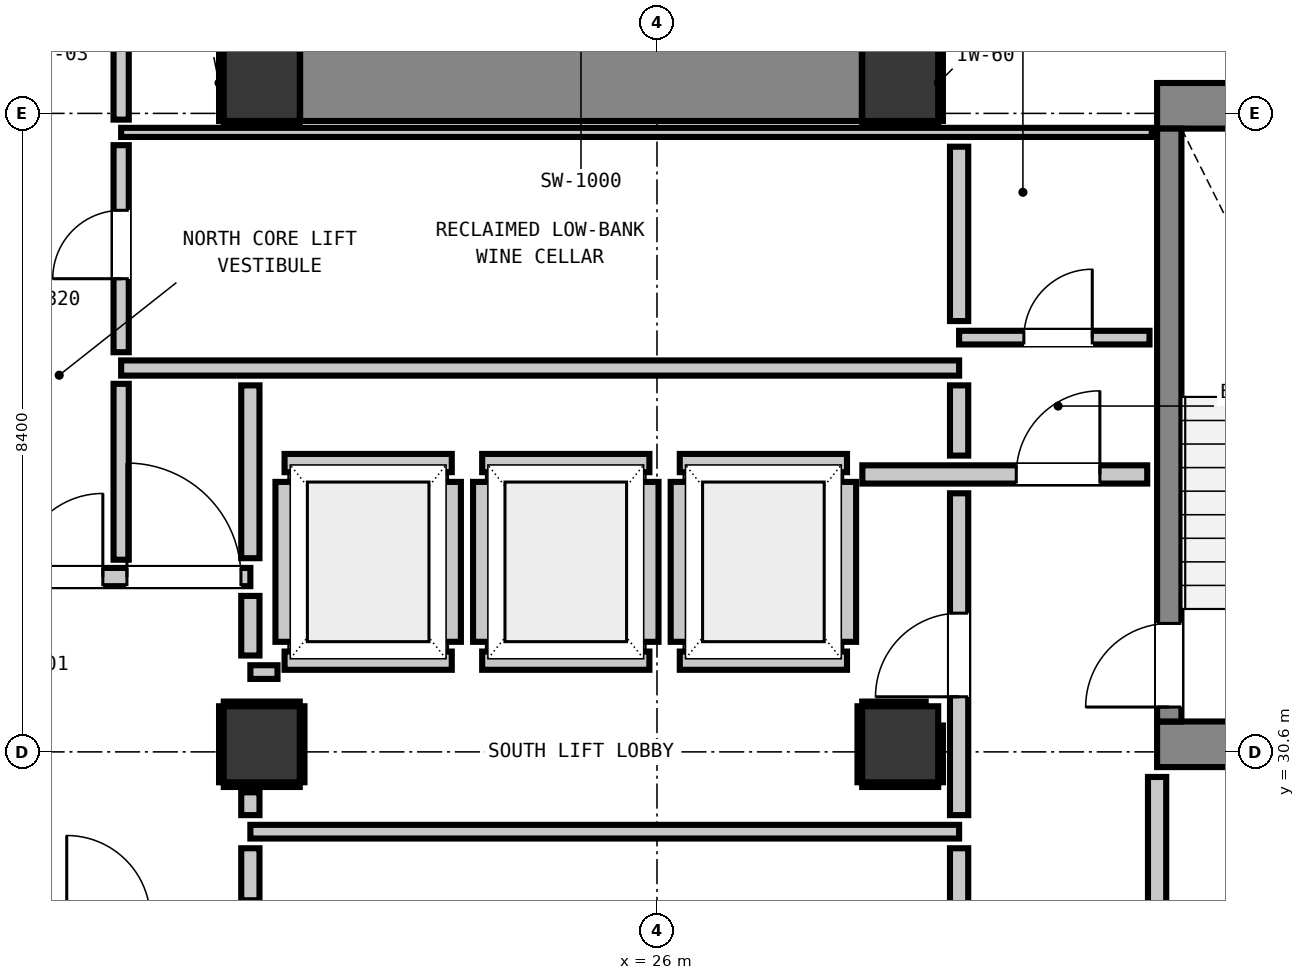
"""IFC4 building model, lengths in metres.
Left out: names, types, materials, properties, quantities, classifications, styles, units other than length and angle.
Written with IfcOpenShell. Run it as: python <this file> out.ifc"""

import sys

from ifc_helpers import new_model, si_unit, direction, frame, frame_2d, origin, origin_2d, place, context, subcontext, project, spatial, rectangle, extrude, element, fill, save


model = new_model("IFC4")
c1 = context("Model", 3, precision=1e-05, world=origin(), true_north=direction((0.0, 1.0)))
c2 = subcontext(c1, "Body", "Model", "MODEL_VIEW")
j1 = project(units=[si_unit("LENGTHUNIT", "METRE"), si_unit("PLANEANGLEUNIT", "RADIAN")], contexts=[c1])
p1 = place(None, origin())
s1 = spatial("IfcSite", under=j1, at=p1, CompositionType="ELEMENT")
p2 = place(p1, origin())
s2 = spatial("IfcBuilding", under=s1, at=p2, CompositionType="ELEMENT")
p3 = place(p2, frame((0.0, 0.0, 159.2)))
s3 = spatial("IfcBuildingStorey", under=s2, at=p3, CompositionType="ELEMENT", Elevation=159.2)
for number, where, z_axis, x_axis in (
    (1, (20.8, 39.4, 0.0), (0.0, 0.0, 1.0), (1.0, 0.0, 0.0)),
    (2, (29.2, 39.4, 0.0), (0.0, 0.0, 1.0), (1.0, 0.0, 0.0)),
):
    element("IfcColumn", number, at=place(p3, frame(where, z_axis=z_axis, x_axis=x_axis)), inside=s3, PredefinedType="COLUMN", context=c2, shape_type="SweptSolid", body=[
        extrude(rectangle(XDim=1.0, YDim=1.0, at=origin_2d()), origin(), (0.0, 0.0, 1.0), 3.32),
    ])
p4 = place(p3, frame((32.58, 39.1, 0.0), z_axis=(0.0, 0.0, 1.0), x_axis=(1.0, 0.0, 0.0)))
e3 = element("IfcWall", 3, at=p4, inside=s3, PredefinedType="SHEAR", context=c2, shape_type="SweptSolid", body=[
    extrude(rectangle(XDim=4.08, YDim=0.6, at=frame_2d((2.04, 0.0))), origin(), (0.0, 0.0, 1.0), 3.32),
])
p5 = place(p3, frame((32.58, 30.7, 0.0), z_axis=(0.0, 0.0, 1.0), x_axis=(1.0, 0.0, 0.0)))
e4 = element("IfcWall", 4, at=p5, inside=s3, PredefinedType="SHEAR", context=c2, shape_type="SweptSolid", body=[
    extrude(rectangle(XDim=3.415, YDim=0.6, at=frame_2d((1.708, 0.0))), origin(), (0.0, 0.0, 1.0), 3.32),
])
p6 = place(p3, frame((21.305, 39.4, 0.0), z_axis=(0.0, 0.0, 1.0), x_axis=(1.0, 0.0, 0.0)))
e5 = element("IfcWall", 5, at=p6, inside=s3, PredefinedType="SHEAR", context=c2, shape_type="SweptSolid", body=[
    extrude(rectangle(XDim=7.39, YDim=1.0, at=frame_2d((3.695, 0.0))), origin(), (0.0, 0.0, 1.0), 3.32),
])
p7 = place(p3, frame((32.74, 31.0, 0.0), z_axis=(0.0, 0.0, 1.0), x_axis=(0.0, 1.0, 0.0)))
e6 = element("IfcWall", 6, at=p7, inside=s3, PredefinedType="SHEAR", context=c2, shape_type="SweptSolid", body=[
    extrude(rectangle(XDim=7.8, YDim=0.32, at=frame_2d((3.9, 0.0))), origin(), (0.0, 0.0, 1.0), 3.32),
])
p8 = place(p7, frame((0.19, 0.0, 0.0)))
e7 = element("IfcOpeningElement", 7, at=p8, cuts=e6, PredefinedType="OPENING", context=c2, shape_type="SweptSolid", body=[
    extrude(rectangle(XDim=1.1, YDim=2.15, at=frame_2d((0.55, 1.075))), frame((0.0, 0.17, 0.0), z_axis=(0.0, -1.0, 0.0), x_axis=(1.0, 0.0, 0.0)), (0.0, 0.0, 1.0), 0.34),
])
for number, where, z_axis, x_axis in (
    (8, (20.8, 30.7, 0.0), (0.0, 0.0, 1.0), (1.0, 0.0, 0.0)),
    (9, (29.2, 30.7, 0.0), (0.0, 0.0, 1.0), (1.0, 0.0, 0.0)),
):
    element("IfcColumn", number, at=place(p3, frame(where, z_axis=z_axis, x_axis=x_axis)), inside=s3, PredefinedType="COLUMN", context=c2, shape_type="SweptSolid", body=[
        extrude(rectangle(XDim=1.0, YDim=1.0, at=origin_2d()), origin(), (0.0, 0.0, 1.0), 3.32),
    ])
for number, where, z_axis, x_axis in (
    (10, (21.1, 31.8, 0.0), (0.0, 0.0, 1.0), (1.0, 0.0, 0.0)),
    (11, (21.1, 34.4, 0.0), (0.0, 0.0, 1.0), (1.0, 0.0, 0.0)),
):
    element("IfcWall", number, at=place(p3, frame(where, z_axis=z_axis, x_axis=x_axis)), inside=s3, PredefinedType="PARTITIONING", context=c2, shape_type="SweptSolid", body=[
        extrude(rectangle(XDim=2.2, YDim=0.24, at=frame_2d((1.1, 0.0))), origin(), (0.0, 0.0, 1.0), 3.08),
    ])
p9 = place(p3, frame((21.1, 32.048, 0.0), z_axis=(0.0, 0.0, 1.0), x_axis=(0.0, 1.0, 0.0)))
e12 = element("IfcWall", 12, at=p9, inside=s3, PredefinedType="PARTITIONING", context=c2, shape_type="SweptSolid", body=[
    extrude(rectangle(XDim=2.104, YDim=0.24, at=frame_2d((1.052, 0.0))), origin(), (0.0, 0.0, 1.0), 2.315),
])
p10 = place(p3, frame((23.3, 32.048, 0.0), z_axis=(0.0, 0.0, 1.0), x_axis=(0.0, 1.0, 0.0)))
e13 = element("IfcWall", 13, at=p10, inside=s3, PredefinedType="PARTITIONING", context=c2, shape_type="SweptSolid", body=[
    extrude(rectangle(XDim=2.104, YDim=0.24, at=frame_2d((1.052, 0.0))), origin(), (0.0, 0.0, 1.0), 3.08),
])
for number, where, z_axis, x_axis in (
    (14, (23.7, 31.8, 0.0), (0.0, 0.0, 1.0), (1.0, 0.0, 0.0)),
    (15, (23.7, 34.4, 0.0), (0.0, 0.0, 1.0), (1.0, 0.0, 0.0)),
):
    element("IfcWall", number, at=place(p3, frame(where, z_axis=z_axis, x_axis=x_axis)), inside=s3, PredefinedType="PARTITIONING", context=c2, shape_type="SweptSolid", body=[
        extrude(rectangle(XDim=2.2, YDim=0.24, at=frame_2d((1.1, 0.0))), origin(), (0.0, 0.0, 1.0), 3.08),
    ])
for number, where, z_axis, x_axis in (
    (16, (23.7, 32.048, 0.0), (0.0, 0.0, 1.0), (0.0, 1.0, 0.0)),
    (17, (25.9, 32.048, 0.0), (0.0, 0.0, 1.0), (0.0, 1.0, 0.0)),
):
    element("IfcWall", number, at=place(p3, frame(where, z_axis=z_axis, x_axis=x_axis)), inside=s3, PredefinedType="PARTITIONING", context=c2, shape_type="SweptSolid", body=[
        extrude(rectangle(XDim=2.104, YDim=0.24, at=frame_2d((1.052, 0.0))), origin(), (0.0, 0.0, 1.0), 3.08),
    ])
for number, where, z_axis, x_axis in (
    (18, (26.3, 31.8, 0.0), (0.0, 0.0, 1.0), (1.0, 0.0, 0.0)),
    (19, (26.3, 34.4, 0.0), (0.0, 0.0, 1.0), (1.0, 0.0, 0.0)),
):
    element("IfcWall", number, at=place(p3, frame(where, z_axis=z_axis, x_axis=x_axis)), inside=s3, PredefinedType="PARTITIONING", context=c2, shape_type="SweptSolid", body=[
        extrude(rectangle(XDim=2.2, YDim=0.24, at=frame_2d((1.1, 0.0))), origin(), (0.0, 0.0, 1.0), 3.08),
    ])
for number, where, z_axis, x_axis in (
    (20, (26.3, 32.048, 0.0), (0.0, 0.0, 1.0), (0.0, 1.0, 0.0)),
    (21, (28.5, 32.048, 0.0), (0.0, 0.0, 1.0), (0.0, 1.0, 0.0)),
):
    element("IfcWall", number, at=place(p3, frame(where, z_axis=z_axis, x_axis=x_axis)), inside=s3, PredefinedType="PARTITIONING", context=c2, shape_type="SweptSolid", body=[
        extrude(rectangle(XDim=2.104, YDim=0.24, at=frame_2d((1.052, 0.0))), origin(), (0.0, 0.0, 1.0), 3.08),
    ])
p11 = place(p3, frame((17.45, 32.9, 0.0), z_axis=(0.0, 0.0, 1.0), x_axis=(1.0, 0.0, 0.0)))
e22 = element("IfcWall", 22, at=p11, inside=s3, PredefinedType="PARTITIONING", context=c2, shape_type="SweptSolid", body=[
    extrude(rectangle(XDim=3.2, YDim=0.24, at=frame_2d((1.6, 0.0))), origin(), (0.0, 0.0, 1.0), 3.08),
])
p12 = place(p11, frame((0.159, 0.0, 0.0)))
e23 = element("IfcOpeningElement", 23, at=p12, cuts=e22, PredefinedType="OPENING", context=c2, shape_type="SweptSolid", body=[
    extrude(rectangle(XDim=1.1, YDim=2.15, at=frame_2d((0.55, 1.075))), frame((0.0, 0.13, 0.0), z_axis=(0.0, -1.0, 0.0), x_axis=(1.0, 0.0, 0.0)), (0.0, 0.0, 1.0), 0.26),
])
p13 = place(p11, frame((1.576, 0.0, 0.0)))
e24 = element("IfcOpeningElement", 24, at=p13, cuts=e22, PredefinedType="OPENING", context=c2, shape_type="SweptSolid", body=[
    extrude(rectangle(XDim=1.5, YDim=2.15, at=frame_2d((0.75, 1.075))), frame((0.0, 0.13, 0.0), z_axis=(0.0, -1.0, 0.0), x_axis=(1.0, 0.0, 0.0)), (0.0, 0.0, 1.0), 0.26),
])
p14 = place(p3, frame((28.702, 34.25, 0.0), z_axis=(0.0, 0.0, 1.0), x_axis=(1.0, 0.0, 0.0)))
e25 = element("IfcWall", 25, at=p14, inside=s3, PredefinedType="PARTITIONING", context=c2, shape_type="SweptSolid", body=[
    extrude(rectangle(XDim=3.748, YDim=0.24, at=frame_2d((1.874, 0.0))), origin(), (0.0, 0.0, 1.0), 3.08),
])
p15 = place(p14, frame((2.025, 0.0, 0.0)))
e26 = element("IfcOpeningElement", 26, at=p15, cuts=e25, PredefinedType="OPENING", context=c2, shape_type="SweptSolid", body=[
    extrude(rectangle(XDim=1.1, YDim=2.15, at=frame_2d((0.55, 1.075))), frame((0.0, 0.13, 0.0), z_axis=(0.0, -1.0, 0.0), x_axis=(1.0, 0.0, 0.0)), (0.0, 0.0, 1.0), 0.26),
])
p16 = place(p3, frame((18.95, 35.65, 0.0), z_axis=(0.0, 0.0, 1.0), x_axis=(1.0, 0.0, 0.0)))
e27 = element("IfcWall", 27, at=p16, inside=s3, PredefinedType="PARTITIONING", context=c2, shape_type="SweptSolid", body=[
    extrude(rectangle(XDim=11.025, YDim=0.2, at=frame_2d((5.513, 0.0))), origin(), (0.0, 0.0, 1.0), 3.08),
])
p17 = place(p3, frame((20.65, 29.55, 0.0), z_axis=(0.0, 0.0, 1.0), x_axis=(1.0, 0.0, 0.0)))
e28 = element("IfcWall", 28, at=p17, inside=s3, PredefinedType="PARTITIONING", context=c2, shape_type="SweptSolid", body=[
    extrude(rectangle(XDim=9.325, YDim=0.18, at=frame_2d((4.663, 0.0))), origin(), (0.0, 0.0, 1.0), 3.08),
])
p18 = place(p3, frame((20.65, 31.65, 0.0), z_axis=(0.0, 0.0, 1.0), x_axis=(1.0, 0.0, 0.0)))
e29 = element("IfcWall", 29, at=p18, inside=s3, PredefinedType="PARTITIONING", context=c2, shape_type="SweptSolid", body=[
    extrude(rectangle(XDim=0.357, YDim=0.18, at=frame_2d((0.179, 0.0))), origin(), (0.0, 0.0, 1.0), 3.08),
])
p19 = place(p3, frame((29.975, 36.05, 0.0), z_axis=(0.0, 0.0, 1.0), x_axis=(1.0, 0.0, 0.0)))
e30 = element("IfcWall", 30, at=p19, inside=s3, PredefinedType="PARTITIONING", context=c2, shape_type="SweptSolid", body=[
    extrude(rectangle(XDim=2.505, YDim=0.18, at=frame_2d((1.252, 0.0))), origin(), (0.0, 0.0, 1.0), 3.08),
])
p20 = place(p19, frame((0.852, 0.0, 0.0)))
e31 = element("IfcOpeningElement", 31, at=p20, cuts=e30, PredefinedType="OPENING", context=c2, shape_type="SweptSolid", body=[
    extrude(rectangle(XDim=0.9, YDim=2.1, at=frame_2d((0.45, 1.05))), frame((0.0, 0.1, 0.0), z_axis=(0.0, -1.0, 0.0), x_axis=(1.0, 0.0, 0.0)), (0.0, 0.0, 1.0), 0.2),
])
p21 = place(p3, frame((18.95, 38.75, 0.0), z_axis=(0.0, 0.0, 1.0), x_axis=(1.0, 0.0, 0.0)))
e32 = element("IfcWall", 32, at=p21, inside=s3, PredefinedType="PARTITIONING", context=c2, shape_type="SweptSolid", body=[
    extrude(rectangle(XDim=13.56, YDim=0.12, at=frame_2d((6.78, 0.0))), origin(), (0.0, 0.0, 1.0), 3.08),
])
p22 = place(p3, frame((20.65, 28.648, 0.0), z_axis=(0.0, 0.0, 1.0), x_axis=(0.0, 1.0, 0.0)))
e33 = element("IfcWall", 33, at=p22, inside=s3, PredefinedType="PARTITIONING", context=c2, shape_type="SweptSolid", body=[
    extrude(rectangle(XDim=0.684, YDim=0.24, at=frame_2d((0.342, 0.0))), origin(), (0.0, 0.0, 1.0), 2.315),
])
p23 = place(p3, frame((20.65, 29.768, 0.0), z_axis=(0.0, 0.0, 1.0), x_axis=(0.0, 1.0, 0.0)))
e34 = element("IfcWall", 34, at=p23, inside=s3, PredefinedType="PARTITIONING", context=c2, shape_type="SweptSolid", body=[
    extrude(rectangle(XDim=0.3, YDim=0.24, at=frame_2d((0.15, 0.0))), origin(), (0.0, 0.0, 1.0), 2.315),
])
p24 = place(p3, frame((20.65, 31.868, 0.0), z_axis=(0.0, 0.0, 1.0), x_axis=(0.0, 1.0, 0.0)))
e35 = element("IfcWall", 35, at=p24, inside=s3, PredefinedType="PARTITIONING", context=c2, shape_type="SweptSolid", body=[
    extrude(rectangle(XDim=0.784, YDim=0.24, at=frame_2d((0.392, 0.0))), origin(), (0.0, 0.0, 1.0), 2.315),
])
p25 = place(p3, frame((20.65, 33.148, 0.0), z_axis=(0.0, 0.0, 1.0), x_axis=(0.0, 1.0, 0.0)))
e36 = element("IfcWall", 36, at=p25, inside=s3, PredefinedType="PARTITIONING", context=c2, shape_type="SweptSolid", body=[
    extrude(rectangle(XDim=2.274, YDim=0.24, at=frame_2d((1.137, 0.0))), origin(), (0.0, 0.0, 1.0), 2.315),
])
p26 = place(p3, frame((29.975, 25.648, 0.0), z_axis=(0.0, 0.0, 1.0), x_axis=(0.0, 1.0, 0.0)))
e37 = element("IfcWall", 37, at=p26, inside=s3, PredefinedType="PARTITIONING", context=c2, shape_type="SweptSolid", body=[
    extrude(rectangle(XDim=3.684, YDim=0.24, at=frame_2d((1.842, 0.0))), origin(), (0.0, 0.0, 1.0), 3.08),
])
p27 = place(p3, frame((29.975, 29.768, 0.0), z_axis=(0.0, 0.0, 1.0), x_axis=(0.0, 1.0, 0.0)))
e38 = element("IfcWall", 38, at=p27, inside=s3, PredefinedType="PARTITIONING", context=c2, shape_type="SweptSolid", body=[
    extrude(rectangle(XDim=4.234, YDim=0.24, at=frame_2d((2.117, 0.0))), origin(), (0.0, 0.0, 1.0), 3.08),
])
p28 = place(p27, frame((1.557, 0.0, 0.0)))
e39 = element("IfcOpeningElement", 39, at=p28, cuts=e38, PredefinedType="OPENING", context=c2, shape_type="SweptSolid", body=[
    extrude(rectangle(XDim=1.1, YDim=2.15, at=frame_2d((0.55, 1.075))), frame((0.0, 0.13, 0.0), z_axis=(0.0, -1.0, 0.0), x_axis=(1.0, 0.0, 0.0)), (0.0, 0.0, 1.0), 0.26),
])
p29 = place(p3, frame((29.975, 34.498, 0.0), z_axis=(0.0, 0.0, 1.0), x_axis=(0.0, 1.0, 0.0)))
e40 = element("IfcWall", 40, at=p29, inside=s3, PredefinedType="PARTITIONING", context=c2, shape_type="SweptSolid", body=[
    extrude(rectangle(XDim=0.924, YDim=0.24, at=frame_2d((0.462, 0.0))), origin(), (0.0, 0.0, 1.0), 3.08),
])
p30 = place(p3, frame((29.975, 36.268, 0.0), z_axis=(0.0, 0.0, 1.0), x_axis=(0.0, 1.0, 0.0)))
e41 = element("IfcWall", 41, at=p30, inside=s3, PredefinedType="PARTITIONING", context=c2, shape_type="SweptSolid", body=[
    extrude(rectangle(XDim=2.294, YDim=0.24, at=frame_2d((1.147, 0.0))), origin(), (0.0, 0.0, 1.0), 3.08),
])
p31 = place(p3, frame((32.58, 25.648, 0.0), z_axis=(0.0, 0.0, 1.0), x_axis=(0.0, 1.0, 0.0)))
e42 = element("IfcWall", 42, at=p31, inside=s3, PredefinedType="PARTITIONING", context=c2, shape_type="SweptSolid", body=[
    extrude(rectangle(XDim=4.622, YDim=0.24, at=frame_2d((2.311, 0.0))), origin(), (0.0, 0.0, 1.0), 3.08),
])
p32 = place(p3, frame((18.95, 33.128, 0.0), z_axis=(0.0, 0.0, 1.0), x_axis=(0.0, 1.0, 0.0)))
e43 = element("IfcWall", 43, at=p32, inside=s3, PredefinedType="PARTITIONING", context=c2, shape_type="SweptSolid", body=[
    extrude(rectangle(XDim=2.314, YDim=0.2, at=frame_2d((1.157, 0.0))), origin(), (0.0, 0.0, 1.0), 3.08),
])
p33 = place(p3, frame((18.95, 35.858, 0.0), z_axis=(0.0, 0.0, 1.0), x_axis=(0.0, 1.0, 0.0)))
e44 = element("IfcWall", 44, at=p33, inside=s3, PredefinedType="PARTITIONING", context=c2, shape_type="SweptSolid", body=[
    extrude(rectangle(XDim=2.724, YDim=0.2, at=frame_2d((1.362, 0.0))), origin(), (0.0, 0.0, 1.0), 3.08),
])
p34 = place(p33, frame((0.967, 0.0, 0.0)))
e45 = element("IfcOpeningElement", 45, at=p34, cuts=e44, PredefinedType="OPENING", context=c2, shape_type="SweptSolid", body=[
    extrude(rectangle(XDim=0.9, YDim=2.1, at=frame_2d((0.45, 1.05))), frame((0.0, 0.11, 0.0), z_axis=(0.0, -1.0, 0.0), x_axis=(1.0, 0.0, 0.0)), (0.0, 0.0, 1.0), 0.22),
])
p35 = place(p3, frame((18.95, 38.918, 0.0), z_axis=(0.0, 0.0, 1.0), x_axis=(0.0, 1.0, 0.0)))
e46 = element("IfcWall", 46, at=p35, inside=s3, PredefinedType="PARTITIONING", context=c2, shape_type="SweptSolid", body=[
    extrude(rectangle(XDim=1.134, YDim=0.2, at=frame_2d((0.567, 0.0))), origin(), (0.0, 0.0, 1.0), 3.08),
])
for number, where, z_axis, x_axis in (
    (47, (20.3, 38.868, 0.0), (0.0, 0.0, 1.0), (1.0, 0.0, 0.0)),
    (48, (20.268, 38.9, 0.0), (0.0, 0.0, 1.0), (0.0, 1.0, 0.0)),
    (49, (28.7, 38.868, 0.0), (0.0, 0.0, 1.0), (1.0, 0.0, 0.0)),
    (50, (29.732, 38.9, 0.0), (0.0, 0.0, 1.0), (0.0, 1.0, 0.0)),
    (51, (20.3, 30.168, 0.0), (0.0, 0.0, 1.0), (1.0, 0.0, 0.0)),
    (52, (20.3, 31.232, 0.0), (0.0, 0.0, 1.0), (1.0, 0.0, 0.0)),
    (53, (20.268, 30.2, 0.0), (0.0, 0.0, 1.0), (0.0, 1.0, 0.0)),
    (54, (21.332, 30.2, 0.0), (0.0, 0.0, 1.0), (0.0, 1.0, 0.0)),
    (55, (28.7, 30.168, 0.0), (0.0, 0.0, 1.0), (1.0, 0.0, 0.0)),
):
    element("IfcWall", number, at=place(p3, frame(where, z_axis=z_axis, x_axis=x_axis)), inside=s3, PredefinedType="PARTITIONING", context=c2, shape_type="SweptSolid", body=[
        extrude(rectangle(XDim=1.0, YDim=0.06, at=frame_2d((0.5, 0.0))), origin(), (0.0, 0.0, 1.0), 1.45),
    ])
p36 = place(p3, frame((28.7, 31.232, 0.0), z_axis=(0.0, 0.0, 1.0), x_axis=(1.0, 0.0, 0.0)))
e56 = element("IfcWall", 56, at=p36, inside=s3, PredefinedType="PARTITIONING", context=c2, shape_type="SweptSolid", body=[
    extrude(rectangle(XDim=0.835, YDim=0.06, at=frame_2d((0.417, 0.0))), origin(), (0.0, 0.0, 1.0), 1.45),
])
p37 = place(p3, frame((28.668, 30.2, 0.0), z_axis=(0.0, 0.0, 1.0), x_axis=(0.0, 1.0, 0.0)))
e57 = element("IfcWall", 57, at=p37, inside=s3, PredefinedType="PARTITIONING", context=c2, shape_type="SweptSolid", body=[
    extrude(rectangle(XDim=1.0, YDim=0.06, at=frame_2d((0.5, 0.0))), origin(), (0.0, 0.0, 1.0), 1.45),
])
p38 = place(p3, frame((29.732, 30.2, 0.0), z_axis=(0.0, 0.0, 1.0), x_axis=(0.0, 1.0, 0.0)))
e58 = element("IfcWall", 58, at=p38, inside=s3, PredefinedType="PARTITIONING", context=c2, shape_type="SweptSolid", body=[
    extrude(rectangle(XDim=0.747, YDim=0.06, at=frame_2d((0.374, 0.0))), origin(), (0.0, 0.0, 1.0), 1.45),
])
p39 = place(p8, origin())
e59 = element("IfcDoor", 59, at=p39, inside=s3, OperationType="SINGLE_SWING_LEFT", PredefinedType="DOOR", context=c2, shape_type="SweptSolid", body=[
    extrude(rectangle(XDim=1.1, YDim=2.15, at=frame_2d((0.55, 1.075))), frame((0.0, 0.025, 0.0), z_axis=(0.0, -1.0, 0.0), x_axis=(1.0, 0.0, 0.0)), (0.0, 0.0, 1.0), 0.05),
])
fill(e7, e59)
p40 = place(p12, origin())
e60 = element("IfcDoor", 60, at=p40, inside=s3, OperationType="SINGLE_SWING_RIGHT", PredefinedType="DOOR", context=c2, shape_type="SweptSolid", body=[
    extrude(rectangle(XDim=1.1, YDim=2.15, at=frame_2d((0.55, 1.075))), frame((0.0, 0.025, 0.0), z_axis=(0.0, -1.0, 0.0), x_axis=(1.0, 0.0, 0.0)), (0.0, 0.0, 1.0), 0.05),
])
fill(e23, e60)
p41 = place(p28, origin())
e61 = element("IfcDoor", 61, at=p41, inside=s3, OperationType="SINGLE_SWING_LEFT", PredefinedType="DOOR", context=c2, shape_type="SweptSolid", body=[
    extrude(rectangle(XDim=1.1, YDim=2.15, at=frame_2d((0.55, 1.075))), frame((0.0, 0.025, 0.0), z_axis=(0.0, -1.0, 0.0), x_axis=(1.0, 0.0, 0.0)), (0.0, 0.0, 1.0), 0.05),
])
fill(e39, e61)
p42 = place(p15, origin())
e62 = element("IfcDoor", 62, at=p42, inside=s3, OperationType="SINGLE_SWING_RIGHT", PredefinedType="DOOR", context=c2, shape_type="SweptSolid", body=[
    extrude(rectangle(XDim=1.1, YDim=2.15, at=frame_2d((0.55, 1.075))), frame((0.0, 0.025, 0.0), z_axis=(0.0, -1.0, 0.0), x_axis=(1.0, 0.0, 0.0)), (0.0, 0.0, 1.0), 0.05),
])
fill(e26, e62)
p43 = place(p13, origin())
e63 = element("IfcDoor", 63, at=p43, inside=s3, OperationType="SINGLE_SWING_LEFT", PredefinedType="DOOR", context=c2, shape_type="SweptSolid", body=[
    extrude(rectangle(XDim=1.5, YDim=2.15, at=frame_2d((0.75, 1.075))), frame((0.0, 0.025, 0.0), z_axis=(0.0, -1.0, 0.0), x_axis=(1.0, 0.0, 0.0)), (0.0, 0.0, 1.0), 0.05),
])
fill(e24, e63)
p44 = place(p20, origin())
e64 = element("IfcDoor", 64, at=p44, inside=s3, OperationType="SINGLE_SWING_RIGHT", PredefinedType="DOOR", context=c2, shape_type="SweptSolid", body=[
    extrude(rectangle(XDim=0.9, YDim=2.1, at=frame_2d((0.45, 1.05))), frame((0.0, 0.025, 0.0), z_axis=(0.0, -1.0, 0.0), x_axis=(1.0, 0.0, 0.0)), (0.0, 0.0, 1.0), 0.05),
])
fill(e31, e64)
p45 = place(p34, origin())
e65 = element("IfcDoor", 65, at=p45, inside=s3, OperationType="SINGLE_SWING_LEFT", PredefinedType="DOOR", context=c2, shape_type="SweptSolid", body=[
    extrude(rectangle(XDim=0.9, YDim=2.1, at=frame_2d((0.45, 1.05))), frame((0.0, 0.025, 0.0), z_axis=(0.0, -1.0, 0.0), x_axis=(1.0, 0.0, 0.0)), (0.0, 0.0, 1.0), 0.05),
])
fill(e45, e65)
save(model, sys.argv[1])
